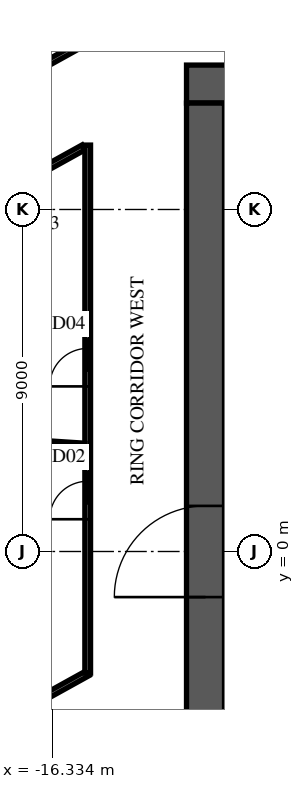
"""IFC4 building model, lengths in metres.
Left out: names, types, materials, properties, quantities, classifications, styles, units other than length and angle.
Written with IfcOpenShell. Run it as: python <this file> out.ifc"""

import sys

from ifc_helpers import new_model, si_unit, direction, frame, frame_2d, origin, place, context, subcontext, project, spatial, rectangle, extrude, element, fill, save


model = new_model("IFC4")
c1 = context("Model", 3, precision=1e-05, world=origin(), true_north=direction((0.0, 1.0)))
c2 = subcontext(c1, "Body", "Model", "MODEL_VIEW")
j1 = project(units=[si_unit("LENGTHUNIT", "METRE"), si_unit("PLANEANGLEUNIT", "RADIAN")], contexts=[c1])
p1 = place(None, origin())
s1 = spatial("IfcSite", under=j1, at=p1, CompositionType="ELEMENT")
p2 = place(p1, origin())
s2 = spatial("IfcBuilding", under=s1, at=p2, CompositionType="ELEMENT")
p3 = place(p2, frame((0.0, 0.0, 135.7)))
s3 = spatial("IfcBuildingStorey", under=s2, at=p3, CompositionType="ELEMENT", Elevation=135.7)
p4 = place(p3, frame((-12.8, 12.3, 0.0), z_axis=(0.0, 0.0, 1.0), x_axis=(1.0, 0.0, 0.0)))
e1 = element("IfcWall", 1, at=p4, inside=s3, PredefinedType="SHEAR", context=c2, shape_type="SweptSolid", body=[
    extrude(rectangle(XDim=25.6, YDim=1.0, at=frame_2d((12.8, 0.0))), origin(), (0.0, 0.0, 1.0), 3.6),
])
p5 = place(p4, frame((11.6, 0.0, 0.0)))
e2 = element("IfcOpeningElement", 2, at=p5, cuts=e1, PredefinedType="OPENING", context=c2, shape_type="SweptSolid", body=[
    extrude(rectangle(XDim=2.4, YDim=2.4, at=frame_2d((1.2, 1.2))), frame((0.0, 0.51, 0.0), z_axis=(0.0, -1.0, 0.0), x_axis=(1.0, 0.0, 0.0)), (0.0, 0.0, 1.0), 1.02),
])
p6 = place(p4, frame((22.425, 0.0, 0.0)))
e3 = element("IfcOpeningElement", 3, at=p6, cuts=e1, PredefinedType="OPENING", context=c2, shape_type="SweptSolid", body=[
    extrude(rectangle(XDim=1.2, YDim=2.1, at=frame_2d((0.6, 1.05))), frame((0.0, 0.51, 0.0), z_axis=(0.0, -1.0, 0.0), x_axis=(1.0, 0.0, 0.0)), (0.0, 0.0, 1.0), 1.02),
])
p7 = place(p4, frame((1.4, 0.0, 0.0)))
e4 = element("IfcOpeningElement", 4, at=p7, cuts=e1, PredefinedType="OPENING", context=c2, shape_type="SweptSolid", body=[
    extrude(rectangle(XDim=1.0, YDim=2.1, at=frame_2d((0.5, 1.05))), frame((0.0, 0.51, 0.0), z_axis=(0.0, -1.0, 0.0), x_axis=(1.0, 0.0, 0.0)), (0.0, 0.0, 1.0), 1.02),
])
p8 = place(p3, frame((-12.3, -11.8, 0.0), z_axis=(0.0, 0.0, 1.0), x_axis=(0.0, 1.0, 0.0)))
e5 = element("IfcWall", 5, at=p8, inside=s3, PredefinedType="SHEAR", context=c2, shape_type="SweptSolid", body=[
    extrude(rectangle(XDim=23.6, YDim=1.0, at=frame_2d((11.8, 0.0))), origin(), (0.0, 0.0, 1.0), 3.6),
])
p9 = place(p8, frame((10.6, 0.0, 0.0)))
e6 = element("IfcOpeningElement", 6, at=p9, cuts=e5, PredefinedType="OPENING", context=c2, shape_type="SweptSolid", body=[
    extrude(rectangle(XDim=2.4, YDim=2.4, at=frame_2d((1.2, 1.2))), frame((0.0, 0.51, 0.0), z_axis=(0.0, -1.0, 0.0), x_axis=(1.0, 0.0, 0.0)), (0.0, 0.0, 1.0), 1.02),
])
p10 = place(p3, frame((8.775, 34.705, 0.0), z_axis=(0.0, 0.0, 1.0), x_axis=(-0.874620778241, -0.484807687922, 0.0)))
e7 = element("IfcWall", 7, at=p10, inside=s3, PredefinedType="STANDARD", context=c2, shape_type="SweptSolid", body=[
    extrude(rectangle(XDim=49.376, YDim=0.6, at=frame_2d((24.688, 0.0))), origin(), (0.0, 0.0, 1.0), 3.6),
])
p11 = place(p10, frame((1.2, 0.0, 0.9)))
e8 = element("IfcOpeningElement", 8, at=p11, cuts=e7, PredefinedType="OPENING", context=c2, shape_type="SweptSolid", body=[
    extrude(rectangle(XDim=2.1, YDim=2.1, at=frame_2d((1.05, 1.05))), frame((0.0, 0.31, 0.0), z_axis=(0.0, -1.0, 0.0), x_axis=(1.0, 0.0, 0.0)), (0.0, 0.0, 1.0), 0.62),
])
p12 = place(p10, frame((5.7, 0.0, 0.9)))
e9 = element("IfcOpeningElement", 9, at=p12, cuts=e7, PredefinedType="OPENING", context=c2, shape_type="SweptSolid", body=[
    extrude(rectangle(XDim=2.1, YDim=2.1, at=frame_2d((1.05, 1.05))), frame((0.0, 0.31, 0.0), z_axis=(0.0, -1.0, 0.0), x_axis=(1.0, 0.0, 0.0)), (0.0, 0.0, 1.0), 0.62),
])
p13 = place(p10, frame((14.7, 0.0, 0.9)))
e10 = element("IfcOpeningElement", 10, at=p13, cuts=e7, PredefinedType="OPENING", context=c2, shape_type="SweptSolid", body=[
    extrude(rectangle(XDim=2.1, YDim=2.1, at=frame_2d((1.05, 1.05))), frame((0.0, 0.31, 0.0), z_axis=(0.0, -1.0, 0.0), x_axis=(1.0, 0.0, 0.0)), (0.0, 0.0, 1.0), 0.62),
])
p14 = place(p10, frame((19.2, 0.0, 0.9)))
e11 = element("IfcOpeningElement", 11, at=p14, cuts=e7, PredefinedType="OPENING", context=c2, shape_type="SweptSolid", body=[
    extrude(rectangle(XDim=2.1, YDim=2.1, at=frame_2d((1.05, 1.05))), frame((0.0, 0.31, 0.0), z_axis=(0.0, -1.0, 0.0), x_axis=(1.0, 0.0, 0.0)), (0.0, 0.0, 1.0), 0.62),
])
p15 = place(p10, frame((23.7, 0.0, 0.9)))
e12 = element("IfcOpeningElement", 12, at=p15, cuts=e7, PredefinedType="OPENING", context=c2, shape_type="SweptSolid", body=[
    extrude(rectangle(XDim=2.1, YDim=2.1, at=frame_2d((1.05, 1.05))), frame((0.0, 0.31, 0.0), z_axis=(0.0, -1.0, 0.0), x_axis=(1.0, 0.0, 0.0)), (0.0, 0.0, 1.0), 0.62),
])
p16 = place(p10, frame((28.2, 0.0, 0.9)))
e13 = element("IfcOpeningElement", 13, at=p16, cuts=e7, PredefinedType="OPENING", context=c2, shape_type="SweptSolid", body=[
    extrude(rectangle(XDim=2.1, YDim=2.1, at=frame_2d((1.05, 1.05))), frame((0.0, 0.31, 0.0), z_axis=(0.0, -1.0, 0.0), x_axis=(1.0, 0.0, 0.0)), (0.0, 0.0, 1.0), 0.62),
])
p17 = place(p10, frame((32.7, 0.0, 0.9)))
e14 = element("IfcOpeningElement", 14, at=p17, cuts=e7, PredefinedType="OPENING", context=c2, shape_type="SweptSolid", body=[
    extrude(rectangle(XDim=2.1, YDim=2.1, at=frame_2d((1.05, 1.05))), frame((0.0, 0.31, 0.0), z_axis=(0.0, -1.0, 0.0), x_axis=(1.0, 0.0, 0.0)), (0.0, 0.0, 1.0), 0.62),
])
p18 = place(p10, frame((37.2, 0.0, 0.9)))
e15 = element("IfcOpeningElement", 15, at=p18, cuts=e7, PredefinedType="OPENING", context=c2, shape_type="SweptSolid", body=[
    extrude(rectangle(XDim=2.1, YDim=2.1, at=frame_2d((1.05, 1.05))), frame((0.0, 0.31, 0.0), z_axis=(0.0, -1.0, 0.0), x_axis=(1.0, 0.0, 0.0)), (0.0, 0.0, 1.0), 0.62),
])
p19 = place(p10, frame((41.7, 0.0, 0.9)))
e16 = element("IfcOpeningElement", 16, at=p19, cuts=e7, PredefinedType="OPENING", context=c2, shape_type="SweptSolid", body=[
    extrude(rectangle(XDim=2.1, YDim=2.1, at=frame_2d((1.05, 1.05))), frame((0.0, 0.31, 0.0), z_axis=(0.0, -1.0, 0.0), x_axis=(1.0, 0.0, 0.0)), (0.0, 0.0, 1.0), 0.62),
])
p20 = place(p10, frame((46.138, 0.0, 0.9)))
e17 = element("IfcOpeningElement", 17, at=p20, cuts=e7, PredefinedType="OPENING", context=c2, shape_type="SweptSolid", body=[
    extrude(rectangle(XDim=2.1, YDim=2.1, at=frame_2d((1.05, 1.05))), frame((0.0, 0.31, 0.0), z_axis=(0.0, -1.0, 0.0), x_axis=(1.0, 0.0, 0.0)), (0.0, 0.0, 1.0), 0.62),
])
p21 = place(p3, frame((-36.291, 4.209, 0.0), z_axis=(0.0, 0.0, 1.0), x_axis=(0.484810659622, -0.874619131003, 0.0)))
e18 = element("IfcWall", 18, at=p21, inside=s3, PredefinedType="STANDARD", context=c2, shape_type="SweptSolid", body=[
    extrude(rectangle(XDim=42.552, YDim=0.6, at=frame_2d((21.276, 0.0))), origin(), (0.0, 0.0, 1.0), 3.6),
])
p22 = place(p21, frame((1.178, 0.0, 0.9)))
e19 = element("IfcOpeningElement", 19, at=p22, cuts=e18, PredefinedType="OPENING", context=c2, shape_type="SweptSolid", body=[
    extrude(rectangle(XDim=1.8, YDim=2.1, at=frame_2d((0.9, 1.05))), frame((0.0, 0.31, 0.0), z_axis=(0.0, -1.0, 0.0), x_axis=(1.0, 0.0, 0.0)), (0.0, 0.0, 1.0), 0.62),
])
p23 = place(p21, frame((5.396, 0.0, 0.9)))
e20 = element("IfcOpeningElement", 20, at=p23, cuts=e18, PredefinedType="OPENING", context=c2, shape_type="SweptSolid", body=[
    extrude(rectangle(XDim=1.8, YDim=2.1, at=frame_2d((0.9, 1.05))), frame((0.0, 0.31, 0.0), z_axis=(0.0, -1.0, 0.0), x_axis=(1.0, 0.0, 0.0)), (0.0, 0.0, 1.0), 0.62),
])
p24 = place(p21, frame((13.956, 0.0, 0.9)))
e21 = element("IfcOpeningElement", 21, at=p24, cuts=e18, PredefinedType="OPENING", context=c2, shape_type="SweptSolid", body=[
    extrude(rectangle(XDim=1.8, YDim=2.1, at=frame_2d((0.9, 1.05))), frame((0.0, 0.31, 0.0), z_axis=(0.0, -1.0, 0.0), x_axis=(1.0, 0.0, 0.0)), (0.0, 0.0, 1.0), 0.62),
])
p25 = place(p21, frame((18.236, 0.0, 0.9)))
e22 = element("IfcOpeningElement", 22, at=p25, cuts=e18, PredefinedType="OPENING", context=c2, shape_type="SweptSolid", body=[
    extrude(rectangle(XDim=1.8, YDim=2.1, at=frame_2d((0.9, 1.05))), frame((0.0, 0.31, 0.0), z_axis=(0.0, -1.0, 0.0), x_axis=(1.0, 0.0, 0.0)), (0.0, 0.0, 1.0), 0.62),
])
p26 = place(p21, frame((22.516, 0.0, 0.9)))
e23 = element("IfcOpeningElement", 23, at=p26, cuts=e18, PredefinedType="OPENING", context=c2, shape_type="SweptSolid", body=[
    extrude(rectangle(XDim=1.8, YDim=2.1, at=frame_2d((0.9, 1.05))), frame((0.0, 0.31, 0.0), z_axis=(0.0, -1.0, 0.0), x_axis=(1.0, 0.0, 0.0)), (0.0, 0.0, 1.0), 0.62),
])
p27 = place(p21, frame((26.796, 0.0, 0.9)))
e24 = element("IfcOpeningElement", 24, at=p27, cuts=e18, PredefinedType="OPENING", context=c2, shape_type="SweptSolid", body=[
    extrude(rectangle(XDim=1.8, YDim=2.1, at=frame_2d((0.9, 1.05))), frame((0.0, 0.31, 0.0), z_axis=(0.0, -1.0, 0.0), x_axis=(1.0, 0.0, 0.0)), (0.0, 0.0, 1.0), 0.62),
])
p28 = place(p21, frame((31.076, 0.0, 0.9)))
e25 = element("IfcOpeningElement", 25, at=p28, cuts=e18, PredefinedType="OPENING", context=c2, shape_type="SweptSolid", body=[
    extrude(rectangle(XDim=1.8, YDim=2.1, at=frame_2d((0.9, 1.05))), frame((0.0, 0.31, 0.0), z_axis=(0.0, -1.0, 0.0), x_axis=(1.0, 0.0, 0.0)), (0.0, 0.0, 1.0), 0.62),
])
p29 = place(p21, frame((35.356, 0.0, 0.9)))
e26 = element("IfcOpeningElement", 26, at=p29, cuts=e18, PredefinedType="OPENING", context=c2, shape_type="SweptSolid", body=[
    extrude(rectangle(XDim=1.8, YDim=2.1, at=frame_2d((0.9, 1.05))), frame((0.0, 0.31, 0.0), z_axis=(0.0, -1.0, 0.0), x_axis=(1.0, 0.0, 0.0)), (0.0, 0.0, 1.0), 0.62),
])
p30 = place(p21, frame((39.573, 0.0, 0.9)))
e27 = element("IfcOpeningElement", 27, at=p30, cuts=e18, PredefinedType="OPENING", context=c2, shape_type="SweptSolid", body=[
    extrude(rectangle(XDim=1.8, YDim=2.1, at=frame_2d((0.9, 1.05))), frame((0.0, 0.31, 0.0), z_axis=(0.0, -1.0, 0.0), x_axis=(1.0, 0.0, 0.0)), (0.0, 0.0, 1.0), 0.62),
])
p31 = place(p3, frame((-25.279, -1.467, 0.0), z_axis=(0.0, 0.0, 1.0), x_axis=(0.484803020703, -0.874623365294, 0.0)))
e28 = element("IfcWall", 28, at=p31, inside=s3, PredefinedType="PARTITIONING", context=c2, shape_type="SweptSolid", body=[
    extrude(rectangle(XDim=22.02, YDim=0.15, at=frame_2d((11.01, 0.0))), origin(), (0.0, 0.0, 1.0), 3.15),
])
p32 = place(p31, frame((6.3, 0.0, 0.0)))
e29 = element("IfcOpeningElement", 29, at=p32, cuts=e28, PredefinedType="OPENING", context=c2, shape_type="SweptSolid", body=[
    extrude(rectangle(XDim=1.8, YDim=2.1, at=frame_2d((0.9, 1.05))), frame((0.0, 0.085, 0.0), z_axis=(0.0, -1.0, 0.0), x_axis=(1.0, 0.0, 0.0)), (0.0, 0.0, 1.0), 0.17),
])
p33 = place(p31, frame((9.948, 0.0, 0.0)))
e30 = element("IfcOpeningElement", 30, at=p33, cuts=e28, PredefinedType="OPENING", context=c2, shape_type="SweptSolid", body=[
    extrude(rectangle(XDim=1.8, YDim=2.1, at=frame_2d((0.9, 1.05))), frame((0.0, 0.085, 0.0), z_axis=(0.0, -1.0, 0.0), x_axis=(1.0, 0.0, 0.0)), (0.0, 0.0, 1.0), 0.17),
])
p34 = place(p31, frame((20.448, 0.0, 0.0)))
e31 = element("IfcOpeningElement", 31, at=p34, cuts=e28, PredefinedType="OPENING", context=c2, shape_type="SweptSolid", body=[
    extrude(rectangle(XDim=1.0, YDim=2.1, at=frame_2d((0.5, 1.05))), frame((0.0, 0.085, 0.0), z_axis=(0.0, -1.0, 0.0), x_axis=(1.0, 0.0, 0.0)), (0.0, 0.0, 1.0), 0.17),
])
p35 = place(p3, frame((-23.187, 9.123, 0.0), z_axis=(0.0, 0.0, 1.0), x_axis=(0.874618419846, 0.484811942578, 0.0)))
e32 = element("IfcWall", 32, at=p35, inside=s3, PredefinedType="PARTITIONING", context=c2, shape_type="SweptSolid", body=[
    extrude(rectangle(XDim=31.713, YDim=0.15, at=frame_2d((15.857, 0.0))), origin(), (0.0, 0.0, 1.0), 3.15),
])
p36 = place(p35, frame((11.252, 0.0, 0.0)))
e33 = element("IfcOpeningElement", 33, at=p36, cuts=e32, PredefinedType="OPENING", context=c2, shape_type="SweptSolid", body=[
    extrude(rectangle(XDim=1.0, YDim=2.1, at=frame_2d((0.5, 1.05))), frame((0.0, 0.085, 0.0), z_axis=(0.0, -1.0, 0.0), x_axis=(1.0, 0.0, 0.0)), (0.0, 0.0, 1.0), 0.17),
])
p37 = place(p35, frame((19.896, 0.0, 0.0)))
e34 = element("IfcOpeningElement", 34, at=p37, cuts=e32, PredefinedType="OPENING", context=c2, shape_type="SweptSolid", body=[
    extrude(rectangle(XDim=1.0, YDim=2.1, at=frame_2d((0.5, 1.05))), frame((0.0, 0.085, 0.0), z_axis=(0.0, -1.0, 0.0), x_axis=(1.0, 0.0, 0.0)), (0.0, 0.0, 1.0), 0.17),
])
p38 = place(p35, frame((29.223, 0.0, 0.0)))
e35 = element("IfcOpeningElement", 35, at=p38, cuts=e32, PredefinedType="OPENING", context=c2, shape_type="SweptSolid", body=[
    extrude(rectangle(XDim=1.0, YDim=2.1, at=frame_2d((0.5, 1.05))), frame((0.0, 0.085, 0.0), z_axis=(0.0, -1.0, 0.0), x_axis=(1.0, 0.0, 0.0)), (0.0, 0.0, 1.0), 0.17),
])
p39 = place(p3, frame((-21.958, 7.06, 0.0), z_axis=(0.0, 0.0, 1.0), x_axis=(0.87462563297, 0.484798929611, 0.0)))
e36 = element("IfcWall", 36, at=p39, inside=s3, PredefinedType="PARTITIONING", context=c2, shape_type="SweptSolid", body=[
    extrude(rectangle(XDim=7.37, YDim=0.15, at=frame_2d((3.685, 0.0))), origin(), (0.0, 0.0, 1.0), 3.15),
])
p40 = place(p39, frame((4.55, 0.0, 0.0)))
e37 = element("IfcOpeningElement", 37, at=p40, cuts=e36, PredefinedType="OPENING", context=c2, shape_type="SweptSolid", body=[
    extrude(rectangle(XDim=1.8, YDim=2.1, at=frame_2d((0.9, 1.05))), frame((0.0, 0.085, 0.0), z_axis=(0.0, -1.0, 0.0), x_axis=(1.0, 0.0, 0.0)), (0.0, 0.0, 1.0), 0.17),
])
p41 = place(p3, frame((-20.056, -5.783, 0.0), z_axis=(0.0, 0.0, 1.0), x_axis=(0.874645694613, 0.484762734638, 0.0)))
e38 = element("IfcWall", 38, at=p41, inside=s3, PredefinedType="PARTITIONING", context=c2, shape_type="SweptSolid", body=[
    extrude(rectangle(XDim=5.324, YDim=0.15, at=frame_2d((2.662, 0.0))), origin(), (0.0, 0.0, 1.0), 3.15),
])
p42 = place(p3, frame((-15.4, -3.201, 0.0), z_axis=(0.0, 0.0, 1.0), x_axis=(0.0, 1.0, 0.0)))
e39 = element("IfcWall", 39, at=p42, inside=s3, PredefinedType="PARTITIONING", context=c2, shape_type="SweptSolid", body=[
    extrude(rectangle(XDim=13.896, YDim=0.15, at=frame_2d((6.948, 0.0))), origin(), (0.0, 0.0, 1.0), 3.15),
])
p43 = place(p42, frame((4.05, 0.0, 0.0)))
e40 = element("IfcOpeningElement", 40, at=p43, cuts=e39, PredefinedType="OPENING", context=c2, shape_type="SweptSolid", body=[
    extrude(rectangle(XDim=1.0, YDim=2.1, at=frame_2d((0.5, 1.05))), frame((0.0, 0.085, 0.0), z_axis=(0.0, -1.0, 0.0), x_axis=(1.0, 0.0, 0.0)), (0.0, 0.0, 1.0), 0.17),
])
p44 = place(p42, frame((7.546, 0.0, 0.0)))
e41 = element("IfcOpeningElement", 41, at=p44, cuts=e39, PredefinedType="OPENING", context=c2, shape_type="SweptSolid", body=[
    extrude(rectangle(XDim=1.0, YDim=2.1, at=frame_2d((0.5, 1.05))), frame((0.0, 0.085, 0.0), z_axis=(0.0, -1.0, 0.0), x_axis=(1.0, 0.0, 0.0)), (0.0, 0.0, 1.0), 0.17),
])
p45 = place(p3, frame((-29.831, 3.732, 0.0), z_axis=(0.0, 0.0, 1.0), x_axis=(0.997896608912, -0.0648255962, 0.0)))
e42 = element("IfcWall", 42, at=p45, inside=s3, PredefinedType="PARTITIONING", context=c2, shape_type="SweptSolid", body=[
    extrude(rectangle(XDim=14.383, YDim=0.1, at=frame_2d((7.191, 0.0))), origin(), (0.0, 0.0, 1.0), 3.03),
])
p46 = place(p9, origin())
e43 = element("IfcDoor", 43, at=p46, inside=s3, OperationType="SINGLE_SWING_LEFT", PredefinedType="DOOR", context=c2, shape_type="SweptSolid", body=[
    extrude(rectangle(XDim=2.4, YDim=2.4, at=frame_2d((1.2, 1.2))), frame((0.0, 0.025, 0.0), z_axis=(0.0, -1.0, 0.0), x_axis=(1.0, 0.0, 0.0)), (0.0, 0.0, 1.0), 0.05),
])
fill(e6, e43)
p47 = place(p43, origin())
e44 = element("IfcDoor", 44, at=p47, inside=s3, OperationType="SINGLE_SWING_RIGHT", PredefinedType="DOOR", context=c2, shape_type="SweptSolid", body=[
    extrude(rectangle(XDim=1.0, YDim=2.1, at=frame_2d((0.5, 1.05))), frame((0.0, 0.025, 0.0), z_axis=(0.0, -1.0, 0.0), x_axis=(1.0, 0.0, 0.0)), (0.0, 0.0, 1.0), 0.05),
])
fill(e40, e44)
p48 = place(p44, origin())
e45 = element("IfcDoor", 45, at=p48, inside=s3, OperationType="SINGLE_SWING_RIGHT", PredefinedType="DOOR", context=c2, shape_type="SweptSolid", body=[
    extrude(rectangle(XDim=1.0, YDim=2.1, at=frame_2d((0.5, 1.05))), frame((0.0, 0.025, 0.0), z_axis=(0.0, -1.0, 0.0), x_axis=(1.0, 0.0, 0.0)), (0.0, 0.0, 1.0), 0.05),
])
fill(e41, e45)
save(model, sys.argv[1])
